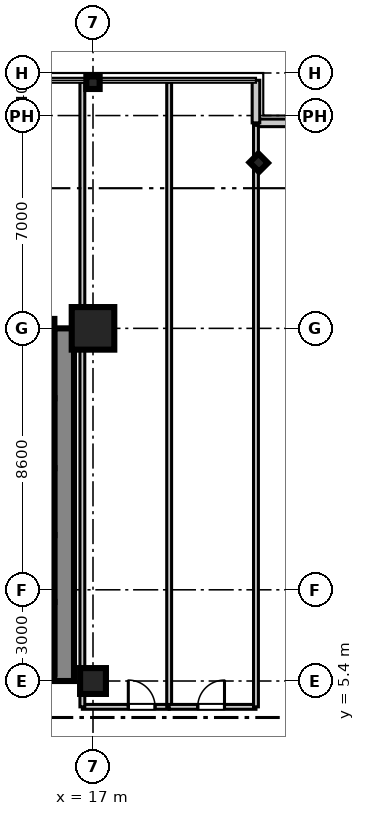
"""IFC4 building model, lengths in metres.
Left out: names, types, materials, properties, quantities, classifications, styles, units other than length and angle.
Written with IfcOpenShell. Run it as: python <this file> out.ifc"""

import sys

from ifc_helpers import new_model, si_unit, direction, frame, frame_2d, origin, origin_2d, place, context, subcontext, project, spatial, rectangle, i_section, extrude, source, transform, mapped, element, fill, save


model = new_model("IFC4")
c1 = context("Model", 3, precision=1e-05, world=origin(), true_north=direction((0.0, 1.0)))
c2 = subcontext(c1, "Body", "Model", "MODEL_VIEW")
j1 = project(units=[si_unit("LENGTHUNIT", "METRE"), si_unit("PLANEANGLEUNIT", "RADIAN")], contexts=[c1])
p1 = place(None, origin())
s1 = spatial("IfcSite", under=j1, at=p1, CompositionType="ELEMENT")
p2 = place(p1, origin())
s2 = spatial("IfcBuilding", under=s1, at=p2, CompositionType="ELEMENT")
p3 = place(p2, frame((0.0, 0.0, 47.0)))
s3 = spatial("IfcBuildingStorey", under=s2, at=p3, CompositionType="ELEMENT", Elevation=47.0)
m1 = source(origin(), c2, "Body", "SweptSolid", [
    extrude(rectangle(XDim=0.85, YDim=0.85, at=origin_2d()), origin(), (0.0, 0.0, 1.0), 3.605),
])
p4 = place(p3, frame((17.0, 5.4, 0.0), z_axis=(0.0, 0.0, 1.0), x_axis=(1.0, 0.0, 0.0)))
e1 = element("IfcColumn", 1, at=p4, inside=s3, PredefinedType="PILASTER", context=c2, shape_type="MappedRepresentation", body=[
    mapped(m1, transform((0.0, 0.0, 0.0), scale=1.0)),
])
m2 = source(origin(), c2, "Body", "SweptSolid", [
    extrude(rectangle(XDim=1.4, YDim=1.4, at=origin_2d()), origin(), (0.0, 0.0, 1.0), 3.605),
])
p5 = place(p3, frame((17.0, 17.0, 0.0), z_axis=(0.0, 0.0, 1.0), x_axis=(1.0, 0.0, 0.0)))
e2 = element("IfcColumn", 2, at=p5, inside=s3, PredefinedType="COLUMN", context=c2, shape_type="MappedRepresentation", body=[
    mapped(m2, transform((0.0, 0.0, 0.0), scale=1.0)),
])
m3 = source(origin(), c2, "Body", "SweptSolid", [
    extrude(i_section(OverallWidth=0.412, OverallDepth=0.438, WebThickness=0.023, FlangeThickness=0.036, at=origin_2d()), origin(), (0.0, 0.0, 1.0), 3.605),
])
for number, where, z_axis, x_axis in (
    (3, (17.0, 25.08, 0.0), (0.0, 0.0, 1.0), (0.0, 1.0, 0.0)),
    (4, (22.45, 22.45, 0.0), (0.0, 0.0, 1.0), (0.707, 0.707, 0.0)),
):
    element("IfcColumn", number, at=place(p3, frame(where, z_axis=z_axis, x_axis=x_axis)), inside=s3, PredefinedType="COLUMN", context=c2, shape_type="MappedRepresentation", body=[
        mapped(m3, transform((0.0, 0.0, 0.0), scale=1.0)),
    ])
m4 = source(origin(), c2, "Body", "SweptSolid", [
    extrude(rectangle(XDim=11.6, YDim=0.65, at=frame_2d((5.8, 0.0))), origin(), (0.0, 0.0, 1.0), 3.37),
])
p6 = place(p3, frame((16.05, 5.4, 0.0), z_axis=(0.0, 0.0, 1.0), x_axis=(0.0, 1.0, 0.0)))
e5 = element("IfcWall", 5, at=p6, inside=s3, PredefinedType="SHEAR", context=c2, shape_type="MappedRepresentation", body=[
    mapped(m4, transform((0.0, 0.0, 0.0), scale=1.0)),
])
m5 = source(origin(), c2, "Body", "SweptSolid", [
    extrude(rectangle(XDim=2.36, YDim=0.22, at=frame_2d((1.18, 0.0))), origin(), (0.0, 0.0, 1.0), 3.37),
])
p7 = place(p3, frame((15.62, 5.64, 0.0), z_axis=(0.0, 0.0, 1.0), x_axis=(0.0, 1.0, 0.0)))
e6 = element("IfcWall", 6, at=p7, inside=s3, PredefinedType="SHEAR", context=c2, shape_type="MappedRepresentation", body=[
    mapped(m5, transform((0.0, 0.0, 0.0), scale=1.0)),
])
m6 = source(origin(), c2, "Body", "SweptSolid", [
    extrude(rectangle(XDim=2.2, YDim=0.22, at=frame_2d((1.1, 0.0))), origin(), (0.0, 0.0, 1.0), 3.37),
])
for number, where, z_axis, x_axis in (
    (7, (15.62, 8.0, 0.0), (0.0, 0.0, 1.0), (0.0, 1.0, 0.0)),
    (8, (15.62, 10.2, 0.0), (0.0, 0.0, 1.0), (0.0, 1.0, 0.0)),
):
    element("IfcWall", number, at=place(p3, frame(where, z_axis=z_axis, x_axis=x_axis)), inside=s3, PredefinedType="SHEAR", context=c2, shape_type="MappedRepresentation", body=[
        mapped(m6, transform((0.0, 0.0, 0.0), scale=1.0)),
    ])
m7 = source(origin(), c2, "Body", "SweptSolid", [
    extrude(rectangle(XDim=2.3, YDim=0.22, at=frame_2d((1.15, 0.0))), origin(), (0.0, 0.0, 1.0), 3.37),
])
p8 = place(p3, frame((15.62, 12.4, 0.0), z_axis=(0.0, 0.0, 1.0), x_axis=(0.0, 1.0, 0.0)))
e9 = element("IfcWall", 9, at=p8, inside=s3, PredefinedType="SHEAR", context=c2, shape_type="MappedRepresentation", body=[
    mapped(m7, transform((0.0, 0.0, 0.0), scale=1.0)),
])
m8 = source(origin(), c2, "Body", "SweptSolid", [
    extrude(rectangle(XDim=2.61, YDim=0.22, at=frame_2d((1.305, 0.0))), origin(), (0.0, 0.0, 1.0), 3.37),
])
p9 = place(p3, frame((15.62, 14.7, 0.0), z_axis=(0.0, 0.0, 1.0), x_axis=(0.0, 1.0, 0.0)))
e10 = element("IfcWall", 10, at=p9, inside=s3, PredefinedType="SHEAR", context=c2, shape_type="MappedRepresentation", body=[
    mapped(m8, transform((0.0, 0.0, 0.0), scale=1.0)),
])
m9 = source(origin(), c2, "Body", "SweptSolid", [
    extrude(rectangle(XDim=1.4, YDim=0.25, at=frame_2d((0.7, 0.0))), origin(), (0.0, 0.0, 1.0), 3.37),
])
for number, where, z_axis, x_axis in (
    (11, (22.36, 23.76, 0.0), (0.0, 0.0, 1.0), (1.0, 0.0, 0.0)),
    (12, (22.36, 23.76, 0.0), (0.0, 0.0, 1.0), (0.0, 1.0, 0.0)),
):
    element("IfcWall", number, at=place(p3, frame(where, z_axis=z_axis, x_axis=x_axis)), inside=s3, PredefinedType="STANDARD", context=c2, shape_type="MappedRepresentation", body=[
        mapped(m9, transform((0.0, 0.0, 0.0), scale=1.0)),
    ])
m10 = source(origin(), c2, "Body", "SweptSolid", [
    extrude(rectangle(XDim=2.855, YDim=0.16, at=frame_2d((1.427, 0.0))), origin(), (0.0, 0.0, 1.0), 2.71),
])
p10 = place(p3, frame((16.65, 4.55, 0.0), z_axis=(0.0, 0.0, 1.0), x_axis=(1.0, 0.0, 0.0)))
e13 = element("IfcWall", 13, at=p10, inside=s3, PredefinedType="PARTITIONING", context=c2, shape_type="MappedRepresentation", body=[
    mapped(m10, transform((0.0, 0.0, 0.0), scale=1.0)),
])
p11 = place(p10, frame((1.511, 0.0, 0.0)))
e14 = element("IfcOpeningElement", 14, at=p11, cuts=e13, PredefinedType="OPENING", context=c2, shape_type="SweptSolid", body=[
    extrude(rectangle(XDim=0.88, YDim=2.1, at=frame_2d((0.44, 1.05))), frame((0.0, 0.09, 0.0), z_axis=(0.0, -1.0, 0.0), x_axis=(1.0, 0.0, 0.0)), (0.0, 0.0, 1.0), 0.18),
])
m11 = source(origin(), c2, "Body", "SweptSolid", [
    extrude(rectangle(XDim=20.55, YDim=0.16, at=frame_2d((10.275, 0.0))), origin(), (0.0, 0.0, 1.0), 2.71),
])
for number, where, z_axis, x_axis in (
    (15, (16.65, 4.55, 0.0), (0.0, 0.0, 1.0), (0.0, 1.0, 0.0)),
    (16, (19.505, 4.55, 0.0), (0.0, 0.0, 1.0), (0.0, 1.0, 0.0)),
):
    element("IfcWall", number, at=place(p3, frame(where, z_axis=z_axis, x_axis=x_axis)), inside=s3, PredefinedType="PARTITIONING", context=c2, shape_type="MappedRepresentation", body=[
        mapped(m11, transform((0.0, 0.0, 0.0), scale=1.0)),
    ])
m12 = source(origin(), c2, "Body", "SweptSolid", [
    extrude(rectangle(XDim=2.855, YDim=0.16, at=frame_2d((1.428, 0.0))), origin(), (0.0, 0.0, 1.0), 2.71),
])
p12 = place(p3, frame((19.505, 4.55, 0.0), z_axis=(0.0, 0.0, 1.0), x_axis=(1.0, 0.0, 0.0)))
e17 = element("IfcWall", 17, at=p12, inside=s3, PredefinedType="PARTITIONING", context=c2, shape_type="MappedRepresentation", body=[
    mapped(m12, transform((0.0, 0.0, 0.0), scale=1.0)),
])
p13 = place(p12, frame((0.94, 0.0, 0.0)))
e18 = element("IfcOpeningElement", 18, at=p13, cuts=e17, PredefinedType="OPENING", context=c2, shape_type="SweptSolid", body=[
    extrude(rectangle(XDim=0.88, YDim=2.1, at=frame_2d((0.44, 1.05))), frame((0.0, 0.09, 0.0), z_axis=(0.0, -1.0, 0.0), x_axis=(1.0, 0.0, 0.0)), (0.0, 0.0, 1.0), 0.18),
])
m13 = source(origin(), c2, "Body", "SweptSolid", [
    extrude(rectangle(XDim=19.13, YDim=0.16, at=frame_2d((9.565, 0.0))), origin(), (0.0, 0.0, 1.0), 2.71),
])
p14 = place(p3, frame((22.36, 4.55, 0.0), z_axis=(0.0, 0.0, 1.0), x_axis=(0.0, 1.0, 0.0)))
e19 = element("IfcWall", 19, at=p14, inside=s3, PredefinedType="PARTITIONING", context=c2, shape_type="MappedRepresentation", body=[
    mapped(m13, transform((0.0, 0.0, 0.0), scale=1.0)),
])
m14 = source(origin(), c2, "Body", "SweptSolid", [
    extrude(rectangle(XDim=0.88, YDim=2.1, at=frame_2d((0.44, 1.05))), frame((0.0, 0.025, 0.0), z_axis=(0.0, -1.0, 0.0), x_axis=(1.0, 0.0, 0.0)), (0.0, 0.0, 1.0), 0.05),
])
p15 = place(p11, origin())
e20 = element("IfcDoor", 20, at=p15, inside=s3, OperationType="SINGLE_SWING_LEFT", PredefinedType="DOOR", context=c2, shape_type="MappedRepresentation", body=[
    mapped(m14, transform((0.0, 0.0, 0.0), scale=1.0)),
])
fill(e14, e20)
p16 = place(p13, origin())
e21 = element("IfcDoor", 21, at=p16, inside=s3, OperationType="SINGLE_SWING_RIGHT", PredefinedType="DOOR", context=c2, shape_type="MappedRepresentation", body=[
    mapped(m14, transform((0.0, 0.0, 0.0), scale=1.0)),
])
fill(e18, e21)
save(model, sys.argv[1])
